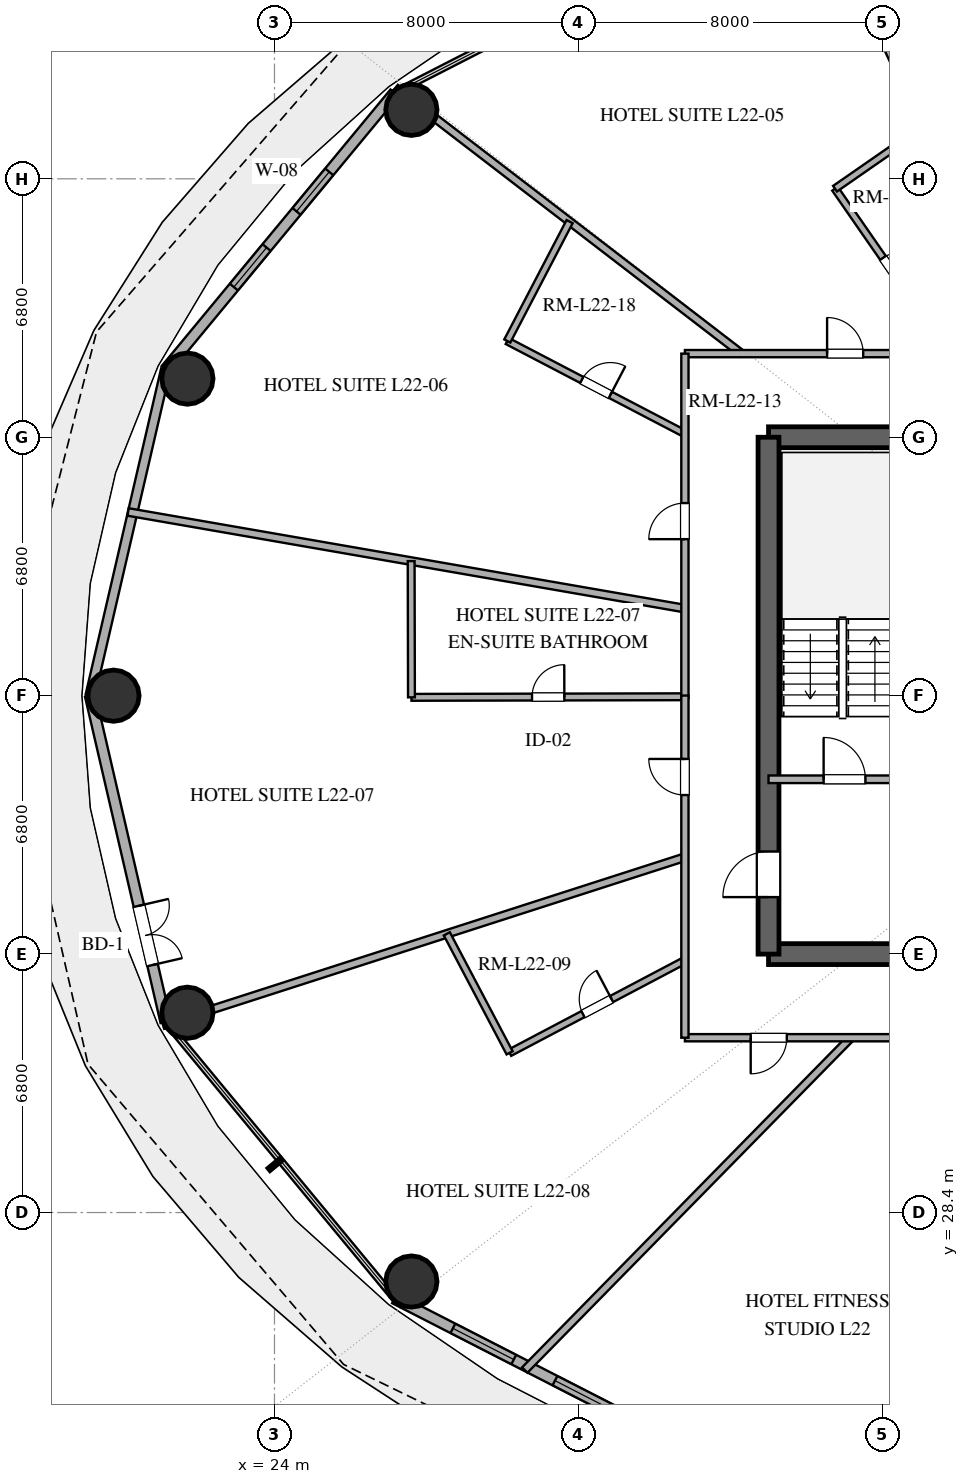
"""IFC4 building model, lengths in metres.
Left out: names, types, materials, properties, quantities, classifications, styles, units other than length and angle.
Written with IfcOpenShell. Run it as: python <this file> out.ifc"""

import sys

from ifc_helpers import new_model, si_unit, direction, frame, frame_2d, origin, origin_2d, place, context, subcontext, project, spatial, rectangle, hollow_circle, extrude, element, fill, save


model = new_model("IFC4")
c1 = context("Model", 3, precision=1e-05, world=origin(), true_north=direction((0.0, 1.0)))
c2 = subcontext(c1, "Body", "Model", "MODEL_VIEW")
j1 = project(units=[si_unit("LENGTHUNIT", "METRE"), si_unit("PLANEANGLEUNIT", "RADIAN")], contexts=[c1])
p1 = place(None, origin())
s1 = spatial("IfcSite", under=j1, at=p1, CompositionType="ELEMENT")
p2 = place(p1, origin())
s2 = spatial("IfcBuilding", under=s1, at=p2, CompositionType="ELEMENT")
p3 = place(p2, frame((0.0, 0.0, 91.2)))
s3 = spatial("IfcBuildingStorey", under=s2, at=p3, CompositionType="ELEMENT", Elevation=91.2)
for number, where, z_axis, x_axis in (
    (1, (37.0, 35.2, 0.0), (0.0, 0.0, 1.0), (1.0, 0.0, 0.0)),
    (2, (37.0, 48.8, 0.0), (0.0, 0.0, 1.0), (1.0, 0.0, 0.0)),
):
    element("IfcWall", number, at=place(p3, frame(where, z_axis=z_axis, x_axis=x_axis)), inside=s3, PredefinedType="SHEAR", context=c2, shape_type="SweptSolid", body=[
        extrude(rectangle(XDim=4.0, YDim=0.55, at=frame_2d((2.0, 0.0))), origin(), (0.0, 0.0, 1.0), 3.38),
    ])
p4 = place(p3, frame((37.0, 35.2, 0.0), z_axis=(0.0, 0.0, 1.0), x_axis=(0.0, 1.0, 0.0)))
e3 = element("IfcWall", 3, at=p4, inside=s3, PredefinedType="SHEAR", context=c2, shape_type="SweptSolid", body=[
    extrude(rectangle(XDim=13.6, YDim=0.55, at=frame_2d((6.8, 0.0))), origin(), (0.0, 0.0, 1.0), 3.38),
])
p5 = place(p4, frame((1.5, 0.0, 0.0)))
e4 = element("IfcOpeningElement", 4, at=p5, cuts=e3, PredefinedType="OPENING", context=c2, shape_type="SweptSolid", body=[
    extrude(rectangle(XDim=1.2, YDim=2.15, at=frame_2d((0.6, 1.075))), frame((0.0, 0.285, 0.0), z_axis=(0.0, -1.0, 0.0), x_axis=(1.0, 0.0, 0.0)), (0.0, 0.0, 1.0), 0.57),
])
for number, where, z_axis, x_axis in (
    (5, (27.602, 57.415, 0.0), (0.0, 0.0, 1.0), (1.0, 0.0, 0.0)),
    (6, (21.709, 50.343, 0.0), (0.0, 0.0, 1.0), (1.0, 0.0, 0.0)),
    (7, (19.763, 42.0, 0.0), (0.0, 0.0, 1.0), (1.0, 0.0, 0.0)),
    (8, (21.709, 33.657, 0.0), (0.0, 0.0, 1.0), (1.0, 0.0, 0.0)),
    (9, (27.602, 26.585, 0.0), (0.0, 0.0, 1.0), (1.0, 0.0, 0.0)),
):
    element("IfcColumn", number, at=place(p3, frame(where, z_axis=z_axis, x_axis=x_axis)), inside=s3, PredefinedType="COLUMN", context=c2, shape_type="SweptSolid", body=[
        extrude(hollow_circle(Radius=0.675, WallThickness=0.036, at=origin_2d()), origin(), (0.0, 0.0, 1.0), 3.38),
    ])
p6 = place(p3, frame((27.16, 57.86, 0.0), z_axis=(0.0, 0.0, 1.0), x_axis=(-0.637505817448, -0.770445541696, 0.0)))
e10 = element("IfcWall", 10, at=p6, inside=s3, PredefinedType="SOLIDWALL", context=c2, shape_type="SweptSolid", body=[
    extrude(rectangle(XDim=9.445, YDim=0.28, at=frame_2d((4.723, 0.0))), origin(), (0.0, 0.0, 1.0), 3.38),
])
p7 = place(p6, frame((2.697, 0.0, 0.85)))
e11 = element("IfcOpeningElement", 11, at=p7, cuts=e10, PredefinedType="OPENING", context=c2, shape_type="SweptSolid", body=[
    extrude(rectangle(XDim=1.35, YDim=1.8, at=frame_2d((0.675, 0.9))), frame((0.0, 0.15, 0.0), z_axis=(0.0, -1.0, 0.0), x_axis=(1.0, 0.0, 0.0)), (0.0, 0.0, 1.0), 0.3),
])
p8 = place(p6, frame((5.282, 0.0, 0.85)))
e12 = element("IfcOpeningElement", 12, at=p8, cuts=e10, PredefinedType="OPENING", context=c2, shape_type="SweptSolid", body=[
    extrude(rectangle(XDim=1.35, YDim=1.8, at=frame_2d((0.675, 0.9))), frame((0.0, 0.15, 0.0), z_axis=(0.0, -1.0, 0.0), x_axis=(1.0, 0.0, 0.0)), (0.0, 0.0, 1.0), 0.3),
])
p9 = place(p3, frame((21.139, 50.583, 0.0), z_axis=(0.0, 0.0, 1.0), x_axis=(-0.22558597182, -0.974223264616, 0.0)))
e13 = element("IfcWall", 13, at=p9, inside=s3, PredefinedType="SOLIDWALL", context=c2, shape_type="SweptSolid", body=[
    extrude(rectangle(XDim=8.811, YDim=0.25, at=frame_2d((4.405, 0.0))), origin(), (0.0, 0.0, 1.0), 3.38),
])
p10 = place(p3, frame((19.151, 42.0, 0.0), z_axis=(0.0, 0.0, 1.0), x_axis=(0.22558597182, -0.974223264616, 0.0)))
e14 = element("IfcWall", 14, at=p10, inside=s3, PredefinedType="SOLIDWALL", context=c2, shape_type="SweptSolid", body=[
    extrude(rectangle(XDim=8.811, YDim=0.28, at=frame_2d((4.405, 0.0))), origin(), (0.0, 0.0, 1.0), 3.38),
])
p11 = place(p10, frame((5.675, 0.0, 0.0)))
e15 = element("IfcOpeningElement", 15, at=p11, cuts=e14, PredefinedType="OPENING", context=c2, shape_type="SweptSolid", body=[
    extrude(rectangle(XDim=1.6, YDim=2.25, at=frame_2d((0.8, 1.125))), frame((0.0, 0.15, 0.0), z_axis=(0.0, -1.0, 0.0), x_axis=(1.0, 0.0, 0.0)), (0.0, 0.0, 1.0), 0.3),
])
p12 = place(p3, frame((27.16, 26.14, 0.0), z_axis=(0.0, 0.0, 1.0), x_axis=(0.889959505023, -0.45603955905, 0.0)))
e16 = element("IfcWall", 16, at=p12, inside=s3, PredefinedType="SOLIDWALL", context=c2, shape_type="SweptSolid", body=[
    extrude(rectangle(XDim=10.662, YDim=0.28, at=frame_2d((5.331, 0.0))), origin(), (0.0, 0.0, 1.0), 3.38),
])
p13 = place(p12, frame((1.724, 0.0, 0.85)))
e17 = element("IfcOpeningElement", 17, at=p13, cuts=e16, PredefinedType="OPENING", context=c2, shape_type="SweptSolid", body=[
    extrude(rectangle(XDim=1.8, YDim=2.2, at=frame_2d((0.9, 1.1))), frame((0.0, 0.15, 0.0), z_axis=(0.0, -1.0, 0.0), x_axis=(1.0, 0.0, 0.0)), (0.0, 0.0, 1.0), 0.3),
])
p14 = place(p12, frame((4.742, 0.0, 0.85)))
e18 = element("IfcOpeningElement", 18, at=p14, cuts=e16, PredefinedType="OPENING", context=c2, shape_type="SweptSolid", body=[
    extrude(rectangle(XDim=1.65, YDim=2.0, at=frame_2d((0.825, 1.0))), frame((0.0, 0.15, 0.0), z_axis=(0.0, -1.0, 0.0), x_axis=(1.0, 0.0, 0.0)), (0.0, 0.0, 1.0), 0.3),
])
p15 = place(p12, frame((6.977, 0.0, 0.85)))
e19 = element("IfcOpeningElement", 19, at=p15, cuts=e16, PredefinedType="OPENING", context=c2, shape_type="SweptSolid", body=[
    extrude(rectangle(XDim=1.65, YDim=2.0, at=frame_2d((0.825, 1.0))), frame((0.0, 0.15, 0.0), z_axis=(0.0, -1.0, 0.0), x_axis=(1.0, 0.0, 0.0)), (0.0, 0.0, 1.0), 0.3),
])
p16 = place(p3, frame((37.0, 39.8, 0.0), z_axis=(0.0, 0.0, 1.0), x_axis=(1.0, 0.0, 0.0)))
e20 = element("IfcWall", 20, at=p16, inside=s3, PredefinedType="SOLIDWALL", context=c2, shape_type="SweptSolid", body=[
    extrude(rectangle(XDim=4.0, YDim=0.2, at=frame_2d((2.0, 0.0))), origin(), (0.0, 0.0, 1.0), 2.74),
])
p17 = place(p16, frame((1.45, 0.0, 0.0)))
e21 = element("IfcOpeningElement", 21, at=p17, cuts=e20, PredefinedType="OPENING", context=c2, shape_type="SweptSolid", body=[
    extrude(rectangle(XDim=1.1, YDim=2.15, at=frame_2d((0.55, 1.075))), frame((0.0, 0.11, 0.0), z_axis=(0.0, -1.0, 0.0), x_axis=(1.0, 0.0, 0.0)), (0.0, 0.0, 1.0), 0.22),
])
p18 = place(p3, frame((39.167, 33.0, 0.0), z_axis=(0.0, 0.0, 1.0), x_axis=(-0.700440086719, -0.713711205542, 0.0)))
e22 = element("IfcWall", 22, at=p18, inside=s3, PredefinedType="PARTITIONING", context=c2, shape_type="SweptSolid", body=[
    extrude(rectangle(XDim=12.252, YDim=0.2, at=frame_2d((6.126, 0.0))), origin(), (0.0, 0.0, 1.0), 2.74),
])
p19 = place(p3, frame((34.8, 37.75, 0.0), z_axis=(0.0, 0.0, 1.0), x_axis=(-0.951880556228, -0.306469258939, 0.0)))
e23 = element("IfcWall", 23, at=p19, inside=s3, PredefinedType="PARTITIONING", context=c2, shape_type="SweptSolid", body=[
    extrude(rectangle(XDim=14.428, YDim=0.2, at=frame_2d((7.214, 0.0))), origin(), (0.0, 0.0, 1.0), 2.74),
])
p20 = place(p3, frame((34.8, 44.291, 0.0), z_axis=(0.0, 0.0, 1.0), x_axis=(-0.985271938133, 0.170994759944, 0.0)))
e24 = element("IfcWall", 24, at=p20, inside=s3, PredefinedType="PARTITIONING", context=c2, shape_type="SweptSolid", body=[
    extrude(rectangle(XDim=14.872, YDim=0.2, at=frame_2d((7.436, 0.0))), origin(), (0.0, 0.0, 1.0), 2.74),
])
p21 = place(p3, frame((27.604, 41.956, 0.0), z_axis=(0.0, 0.0, 1.0), x_axis=(0.999997715604, 0.002137472216, 0.0)))
e25 = element("IfcWall", 25, at=p21, inside=s3, PredefinedType="PLUMBINGWALL", context=c2, shape_type="SweptSolid", body=[
    extrude(rectangle(XDim=7.196, YDim=0.18, at=frame_2d((3.598, 0.0))), origin(), (0.0, 0.0, 1.0), 2.74),
])
p22 = place(p21, frame((3.173, 0.0, 0.0)))
e26 = element("IfcOpeningElement", 26, at=p22, cuts=e25, PredefinedType="OPENING", context=c2, shape_type="SweptSolid", body=[
    extrude(rectangle(XDim=0.85, YDim=2.1, at=frame_2d((0.425, 1.05))), frame((0.0, 0.1, 0.0), z_axis=(0.0, -1.0, 0.0), x_axis=(1.0, 0.0, 0.0)), (0.0, 0.0, 1.0), 0.2),
])
p23 = place(p3, frame((43.847, 51.0, 0.0), z_axis=(0.0, 0.0, 1.0), x_axis=(-0.418953467184, 0.908007704997, 0.0)))
e27 = element("IfcWall", 27, at=p23, inside=s3, PredefinedType="PARTITIONING", context=c2, shape_type="SweptSolid", body=[
    extrude(rectangle(XDim=13.307, YDim=0.2, at=frame_2d((6.654, 0.0))), origin(), (0.0, 0.0, 1.0), 2.74),
])
p24 = place(p3, frame((46.959, 33.0, 0.0), z_axis=(0.0, 0.0, 1.0), x_axis=(-1.0, 0.0, 0.0)))
e28 = element("IfcWall", 28, at=p24, inside=s3, PredefinedType="PARTITIONING", context=c2, shape_type="SweptSolid", body=[
    extrude(rectangle(XDim=12.159, YDim=0.19, at=frame_2d((6.08, 0.0))), origin(), (0.0, 0.0, 1.0), 2.74),
])
p25 = place(p24, frame((4.237, 0.0, 0.0)))
e29 = element("IfcOpeningElement", 29, at=p25, cuts=e28, PredefinedType="OPENING", context=c2, shape_type="SweptSolid", body=[
    extrude(rectangle(XDim=1.0, YDim=2.2, at=frame_2d((0.5, 1.1))), frame((0.0, 0.105, 0.0), z_axis=(0.0, -1.0, 0.0), x_axis=(1.0, 0.0, 0.0)), (0.0, 0.0, 1.0), 0.21),
])
p26 = place(p24, frame((9.478, 0.0, 0.0)))
e30 = element("IfcOpeningElement", 30, at=p26, cuts=e28, PredefinedType="OPENING", context=c2, shape_type="SweptSolid", body=[
    extrude(rectangle(XDim=0.95, YDim=2.15, at=frame_2d((0.475, 1.075))), frame((0.0, 0.105, 0.0), z_axis=(0.0, -1.0, 0.0), x_axis=(1.0, 0.0, 0.0)), (0.0, 0.0, 1.0), 0.21),
])
p27 = place(p3, frame((36.287, 51.0, 0.0), z_axis=(0.0, 0.0, 1.0), x_axis=(-0.792955910196, 0.609279020224, 0.0)))
e31 = element("IfcWall", 31, at=p27, inside=s3, PredefinedType="PARTITIONING", context=c2, shape_type="SweptSolid", body=[
    extrude(rectangle(XDim=11.48, YDim=0.2, at=frame_2d((5.74, 0.0))), origin(), (0.0, 0.0, 1.0), 2.74),
])
p28 = place(p3, frame((34.8, 51.0, 0.0), z_axis=(0.0, 0.0, 1.0), x_axis=(1.0, 0.0, 0.0)))
e32 = element("IfcWall", 32, at=p28, inside=s3, PredefinedType="PARTITIONING", context=c2, shape_type="SweptSolid", body=[
    extrude(rectangle(XDim=9.083, YDim=0.19, at=frame_2d((4.541, 0.0))), origin(), (0.0, 0.0, 1.0), 2.74),
])
p29 = place(p28, frame((3.741, 0.0, 0.0)))
e33 = element("IfcOpeningElement", 33, at=p29, cuts=e32, PredefinedType="OPENING", context=c2, shape_type="SweptSolid", body=[
    extrude(rectangle(XDim=0.95, YDim=2.15, at=frame_2d((0.475, 1.075))), frame((0.0, 0.105, 0.0), z_axis=(0.0, -1.0, 0.0), x_axis=(1.0, 0.0, 0.0)), (0.0, 0.0, 1.0), 0.21),
])
p30 = place(p3, frame((38.75, 55.34, 0.0), z_axis=(0.0, 0.0, 1.0), x_axis=(0.569842064311, -0.821754234393, 0.0)))
e34 = element("IfcWall", 34, at=p30, inside=s3, PredefinedType="PLUMBINGWALL", context=c2, shape_type="SweptSolid", body=[
    extrude(rectangle(XDim=5.281, YDim=0.18, at=frame_2d((2.641, 0.0))), origin(), (0.0, 0.0, 1.0), 2.74),
])
p31 = place(p30, frame((2.215, 0.0, 0.0)))
e35 = element("IfcOpeningElement", 35, at=p31, cuts=e34, PredefinedType="OPENING", context=c2, shape_type="SweptSolid", body=[
    extrude(rectangle(XDim=0.85, YDim=2.1, at=frame_2d((0.425, 1.05))), frame((0.0, 0.1, 0.0), z_axis=(0.0, -1.0, 0.0), x_axis=(1.0, 0.0, 0.0)), (0.0, 0.0, 1.0), 0.2),
])
p32 = place(p3, frame((30.126, 51.332, 0.0), z_axis=(0.0, 0.0, 1.0), x_axis=(0.886465103711, -0.462795440668, 0.0)))
e36 = element("IfcWall", 36, at=p32, inside=s3, PredefinedType="PLUMBINGWALL", context=c2, shape_type="SweptSolid", body=[
    extrude(rectangle(XDim=5.273, YDim=0.18, at=frame_2d((2.636, 0.0))), origin(), (0.0, 0.0, 1.0), 2.74),
])
p33 = place(p32, frame((2.211, 0.0, 0.0)))
e37 = element("IfcOpeningElement", 37, at=p33, cuts=e36, PredefinedType="OPENING", context=c2, shape_type="SweptSolid", body=[
    extrude(rectangle(XDim=0.85, YDim=2.1, at=frame_2d((0.425, 1.05))), frame((0.0, 0.1, 0.0), z_axis=(0.0, -1.0, 0.0), x_axis=(1.0, 0.0, 0.0)), (0.0, 0.0, 1.0), 0.2),
])
p34 = place(p3, frame((30.187, 32.602, 0.0), z_axis=(0.0, 0.0, 1.0), x_axis=(0.884469007168, 0.466598944877, 0.0)))
e38 = element("IfcWall", 38, at=p34, inside=s3, PredefinedType="PLUMBINGWALL", context=c2, shape_type="SweptSolid", body=[
    extrude(rectangle(XDim=5.216, YDim=0.18, at=frame_2d((2.608, 0.0))), origin(), (0.0, 0.0, 1.0), 2.74),
])
p35 = place(p34, frame((2.183, 0.0, 0.0)))
e39 = element("IfcOpeningElement", 39, at=p35, cuts=e38, PredefinedType="OPENING", context=c2, shape_type="SweptSolid", body=[
    extrude(rectangle(XDim=0.85, YDim=2.1, at=frame_2d((0.425, 1.05))), frame((0.0, 0.1, 0.0), z_axis=(0.0, -1.0, 0.0), x_axis=(1.0, 0.0, 0.0)), (0.0, 0.0, 1.0), 0.2),
])
p36 = place(p3, frame((34.8, 41.94, 0.0), z_axis=(0.0, 0.0, 1.0), x_axis=(0.0, 1.0, 0.0)))
e40 = element("IfcWall", 40, at=p36, inside=s3, PredefinedType="PARTITIONING", context=c2, shape_type="SweptSolid", body=[
    extrude(rectangle(XDim=9.06, YDim=0.19, at=frame_2d((4.53, 0.0))), origin(), (0.0, 0.0, 1.0), 2.74),
])
p37 = place(p36, frame((4.179, 0.0, 0.0)))
e41 = element("IfcOpeningElement", 41, at=p37, cuts=e40, PredefinedType="OPENING", context=c2, shape_type="SweptSolid", body=[
    extrude(rectangle(XDim=0.95, YDim=2.15, at=frame_2d((0.475, 1.075))), frame((0.0, 0.105, 0.0), z_axis=(0.0, -1.0, 0.0), x_axis=(1.0, 0.0, 0.0)), (0.0, 0.0, 1.0), 0.21),
])
p38 = place(p3, frame((34.8, 33.0, 0.0), z_axis=(0.0, 0.0, 1.0), x_axis=(0.0, 1.0, 0.0)))
e42 = element("IfcWall", 42, at=p38, inside=s3, PredefinedType="PARTITIONING", context=c2, shape_type="SweptSolid", body=[
    extrude(rectangle(XDim=9.004, YDim=0.19, at=frame_2d((4.502, 0.0))), origin(), (0.0, 0.0, 1.0), 2.74),
])
p39 = place(p38, frame((6.385, 0.0, 0.0)))
e43 = element("IfcOpeningElement", 43, at=p39, cuts=e42, PredefinedType="OPENING", context=c2, shape_type="SweptSolid", body=[
    extrude(rectangle(XDim=0.95, YDim=2.15, at=frame_2d((0.475, 1.075))), frame((0.0, 0.105, 0.0), z_axis=(0.0, -1.0, 0.0), x_axis=(1.0, 0.0, 0.0)), (0.0, 0.0, 1.0), 0.21),
])
p40 = place(p3, frame((27.596, 45.541, 0.0), z_axis=(0.0, 0.0, 1.0), x_axis=(0.002179237538, -0.999997625459, 0.0)))
e44 = element("IfcWall", 44, at=p40, inside=s3, PredefinedType="PLUMBINGWALL", context=c2, shape_type="SweptSolid", body=[
    extrude(rectangle(XDim=3.585, YDim=0.18, at=frame_2d((1.792, 0.0))), origin(), (0.0, 0.0, 1.0), 2.74),
])
p41 = place(p3, frame((31.766, 54.474, 0.0), z_axis=(0.0, 0.0, 1.0), x_axis=(-0.462822582901, -0.886450933079, 0.0)))
e45 = element("IfcWall", 45, at=p41, inside=s3, PredefinedType="PLUMBINGWALL", context=c2, shape_type="SweptSolid", body=[
    extrude(rectangle(XDim=3.544, YDim=0.18, at=frame_2d((1.772, 0.0))), origin(), (0.0, 0.0, 1.0), 2.74),
])
p42 = place(p3, frame((28.535, 35.733, 0.0), z_axis=(0.0, 0.0, 1.0), x_axis=(0.466638742987, -0.884448010651, 0.0)))
e46 = element("IfcWall", 46, at=p42, inside=s3, PredefinedType="PLUMBINGWALL", context=c2, shape_type="SweptSolid", body=[
    extrude(rectangle(XDim=3.54, YDim=0.18, at=frame_2d((1.77, 0.0))), origin(), (0.0, 0.0, 1.0), 2.74),
])
p43 = place(p3, frame((41.095, 56.965, 0.0), z_axis=(0.0, 0.0, 1.0), x_axis=(-0.821788449593, -0.569792720308, 0.0)))
e47 = element("IfcWall", 47, at=p43, inside=s3, PredefinedType="PLUMBINGWALL", context=c2, shape_type="SweptSolid", body=[
    extrude(rectangle(XDim=2.853, YDim=0.18, at=frame_2d((1.427, 0.0))), origin(), (0.0, 0.0, 1.0), 2.74),
])
p44 = place(p7, origin())
e48 = element("IfcWindow", 48, at=p44, inside=s3, PartitioningType="SINGLE_PANEL", PredefinedType="WINDOW", context=c2, shape_type="SweptSolid", body=[
    extrude(rectangle(XDim=1.35, YDim=1.8, at=frame_2d((0.675, 0.9))), frame((0.0, 0.03, 0.0), z_axis=(0.0, -1.0, 0.0), x_axis=(1.0, 0.0, 0.0)), (0.0, 0.0, 1.0), 0.06),
])
fill(e11, e48)
p45 = place(p8, origin())
e49 = element("IfcWindow", 49, at=p45, inside=s3, PartitioningType="SINGLE_PANEL", PredefinedType="WINDOW", context=c2, shape_type="SweptSolid", body=[
    extrude(rectangle(XDim=1.35, YDim=1.8, at=frame_2d((0.675, 0.9))), frame((0.0, 0.03, 0.0), z_axis=(0.0, -1.0, 0.0), x_axis=(1.0, 0.0, 0.0)), (0.0, 0.0, 1.0), 0.06),
])
fill(e12, e49)
p46 = place(p11, origin())
e50 = element("IfcDoor", 50, at=p46, inside=s3, OperationType="DOUBLE_DOOR_SINGLE_SWING", PredefinedType="DOOR", context=c2, shape_type="SweptSolid", body=[
    extrude(rectangle(XDim=1.6, YDim=2.25, at=frame_2d((0.8, 1.125))), frame((0.0, 0.025, 0.0), z_axis=(0.0, -1.0, 0.0), x_axis=(1.0, 0.0, 0.0)), (0.0, 0.0, 1.0), 0.05),
])
fill(e15, e50)
p47 = place(p13, origin())
e51 = element("IfcWindow", 51, at=p47, inside=s3, PartitioningType="SINGLE_PANEL", PredefinedType="WINDOW", context=c2, shape_type="SweptSolid", body=[
    extrude(rectangle(XDim=1.8, YDim=2.2, at=frame_2d((0.9, 1.1))), frame((0.0, 0.03, 0.0), z_axis=(0.0, -1.0, 0.0), x_axis=(1.0, 0.0, 0.0)), (0.0, 0.0, 1.0), 0.06),
])
fill(e17, e51)
p48 = place(p14, origin())
e52 = element("IfcWindow", 52, at=p48, inside=s3, PartitioningType="SINGLE_PANEL", PredefinedType="WINDOW", context=c2, shape_type="SweptSolid", body=[
    extrude(rectangle(XDim=1.65, YDim=2.0, at=frame_2d((0.825, 1.0))), frame((0.0, 0.03, 0.0), z_axis=(0.0, -1.0, 0.0), x_axis=(1.0, 0.0, 0.0)), (0.0, 0.0, 1.0), 0.06),
])
fill(e18, e52)
p49 = place(p5, origin())
e53 = element("IfcDoor", 53, at=p49, inside=s3, OperationType="SINGLE_SWING_LEFT", PredefinedType="DOOR", context=c2, shape_type="SweptSolid", body=[
    extrude(rectangle(XDim=1.2, YDim=2.15, at=frame_2d((0.6, 1.075))), frame((0.0, 0.025, 0.0), z_axis=(0.0, -1.0, 0.0), x_axis=(1.0, 0.0, 0.0)), (0.0, 0.0, 1.0), 0.05),
])
fill(e4, e53)
p50 = place(p17, origin())
e54 = element("IfcDoor", 54, at=p50, inside=s3, OperationType="SINGLE_SWING_LEFT", PredefinedType="DOOR", context=c2, shape_type="SweptSolid", body=[
    extrude(rectangle(XDim=1.1, YDim=2.15, at=frame_2d((0.55, 1.075))), frame((0.0, 0.025, 0.0), z_axis=(0.0, -1.0, 0.0), x_axis=(1.0, 0.0, 0.0)), (0.0, 0.0, 1.0), 0.05),
])
fill(e21, e54)
p51 = place(p22, origin())
e55 = element("IfcDoor", 55, at=p51, inside=s3, OperationType="SINGLE_SWING_RIGHT", PredefinedType="DOOR", context=c2, shape_type="SweptSolid", body=[
    extrude(rectangle(XDim=0.85, YDim=2.1, at=frame_2d((0.425, 1.05))), frame((0.0, 0.025, 0.0), z_axis=(0.0, -1.0, 0.0), x_axis=(1.0, 0.0, 0.0)), (0.0, 0.0, 1.0), 0.05),
])
fill(e26, e55)
p52 = place(p26, origin())
e56 = element("IfcDoor", 56, at=p52, inside=s3, OperationType="SINGLE_SWING_RIGHT", PredefinedType="DOOR", context=c2, shape_type="SweptSolid", body=[
    extrude(rectangle(XDim=0.95, YDim=2.15, at=frame_2d((0.475, 1.075))), frame((0.0, 0.025, 0.0), z_axis=(0.0, -1.0, 0.0), x_axis=(1.0, 0.0, 0.0)), (0.0, 0.0, 1.0), 0.05),
])
fill(e30, e56)
p53 = place(p29, origin())
e57 = element("IfcDoor", 57, at=p53, inside=s3, OperationType="SINGLE_SWING_LEFT", PredefinedType="DOOR", context=c2, shape_type="SweptSolid", body=[
    extrude(rectangle(XDim=0.95, YDim=2.15, at=frame_2d((0.475, 1.075))), frame((0.0, 0.025, 0.0), z_axis=(0.0, -1.0, 0.0), x_axis=(1.0, 0.0, 0.0)), (0.0, 0.0, 1.0), 0.05),
])
fill(e33, e57)
p54 = place(p31, origin())
e58 = element("IfcDoor", 58, at=p54, inside=s3, OperationType="SINGLE_SWING_RIGHT", PredefinedType="DOOR", context=c2, shape_type="SweptSolid", body=[
    extrude(rectangle(XDim=0.85, YDim=2.1, at=frame_2d((0.425, 1.05))), frame((0.0, 0.025, 0.0), z_axis=(0.0, -1.0, 0.0), x_axis=(1.0, 0.0, 0.0)), (0.0, 0.0, 1.0), 0.05),
])
fill(e35, e58)
p55 = place(p33, origin())
e59 = element("IfcDoor", 59, at=p55, inside=s3, OperationType="SINGLE_SWING_RIGHT", PredefinedType="DOOR", context=c2, shape_type="SweptSolid", body=[
    extrude(rectangle(XDim=0.85, YDim=2.1, at=frame_2d((0.425, 1.05))), frame((0.0, 0.025, 0.0), z_axis=(0.0, -1.0, 0.0), x_axis=(1.0, 0.0, 0.0)), (0.0, 0.0, 1.0), 0.05),
])
fill(e37, e59)
p56 = place(p35, origin())
e60 = element("IfcDoor", 60, at=p56, inside=s3, OperationType="SINGLE_SWING_RIGHT", PredefinedType="DOOR", context=c2, shape_type="SweptSolid", body=[
    extrude(rectangle(XDim=0.85, YDim=2.1, at=frame_2d((0.425, 1.05))), frame((0.0, 0.025, 0.0), z_axis=(0.0, -1.0, 0.0), x_axis=(1.0, 0.0, 0.0)), (0.0, 0.0, 1.0), 0.05),
])
fill(e39, e60)
p57 = place(p37, origin())
e61 = element("IfcDoor", 61, at=p57, inside=s3, OperationType="SINGLE_SWING_LEFT", PredefinedType="DOOR", context=c2, shape_type="SweptSolid", body=[
    extrude(rectangle(XDim=0.95, YDim=2.15, at=frame_2d((0.475, 1.075))), frame((0.0, 0.025, 0.0), z_axis=(0.0, -1.0, 0.0), x_axis=(1.0, 0.0, 0.0)), (0.0, 0.0, 1.0), 0.05),
])
fill(e41, e61)
p58 = place(p39, origin())
e62 = element("IfcDoor", 62, at=p58, inside=s3, OperationType="SINGLE_SWING_RIGHT", PredefinedType="DOOR", context=c2, shape_type="SweptSolid", body=[
    extrude(rectangle(XDim=0.95, YDim=2.15, at=frame_2d((0.475, 1.075))), frame((0.0, 0.025, 0.0), z_axis=(0.0, -1.0, 0.0), x_axis=(1.0, 0.0, 0.0)), (0.0, 0.0, 1.0), 0.05),
])
fill(e43, e62)
save(model, sys.argv[1])
